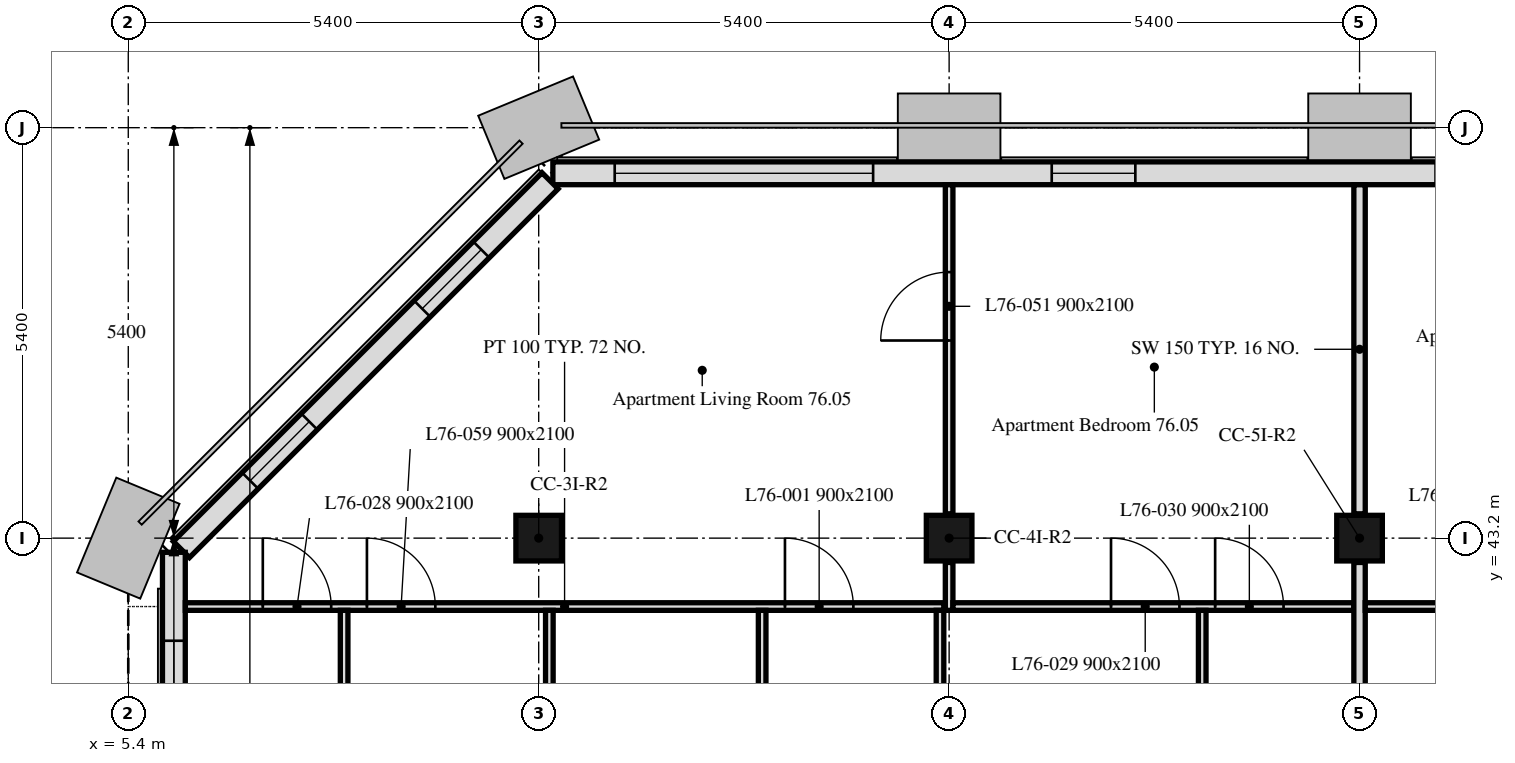
"""IFC4 building model, lengths in metres.
Left out: names, types, materials, properties, quantities, classifications, styles, units other than length and angle.
Written with IfcOpenShell. Run it as: python <this file> out.ifc"""

import sys

from ifc_helpers import new_model, si_unit, direction, frame, frame_2d, origin, origin_2d, place, context, subcontext, project, spatial, rectangle, extrude, element, fill, save


model = new_model("IFC4")
c1 = context("Model", 3, precision=1e-05, world=origin(), true_north=direction((0.0, 1.0)))
c2 = subcontext(c1, "Body", "Model", "MODEL_VIEW")
j1 = project(units=[si_unit("LENGTHUNIT", "METRE"), si_unit("PLANEANGLEUNIT", "RADIAN")], contexts=[c1])
p1 = place(None, origin())
s1 = spatial("IfcSite", under=j1, at=p1, CompositionType="ELEMENT")
p2 = place(p1, origin())
s2 = spatial("IfcBuilding", under=s1, at=p2, CompositionType="ELEMENT")
p3 = place(p2, frame((0.0, 0.0, 304.9)))
s3 = spatial("IfcBuildingStorey", under=s2, at=p3, CompositionType="ELEMENT", Elevation=304.9)
for number, where, z_axis, x_axis in (
    (1, (10.8, 43.2, 0.0), (0.0, 0.0, 1.0), (1.0, 0.0, 0.0)),
    (2, (16.2, 43.2, 0.0), (0.0, 0.0, 1.0), (1.0, 0.0, 0.0)),
    (3, (21.6, 43.2, 0.0), (0.0, 0.0, 1.0), (1.0, 0.0, 0.0)),
):
    element("IfcColumn", number, at=place(p3, frame(where, z_axis=z_axis, x_axis=x_axis)), inside=s3, PredefinedType="COLUMN", context=c2, shape_type="SweptSolid", body=[
        extrude(rectangle(XDim=0.6, YDim=0.6, at=origin_2d()), origin(), (0.0, 0.0, 1.0), 2.8),
    ])
p4 = place(p3, frame((43.014, 48.0, 0.0), z_axis=(0.0, 0.0, 1.0), x_axis=(-1.0, 0.0, 0.0)))
e4 = element("IfcWall", 4, at=p4, inside=s3, PredefinedType="SOLIDWALL", context=c2, shape_type="SweptSolid", body=[
    extrude(rectangle(XDim=32.027, YDim=0.3, at=frame_2d((16.014, 0.0))), origin(), (0.0, 0.0, 1.0), 2.8),
])
p5 = place(p4, frame((2.764, 0.0, 0.9)))
e5 = element("IfcOpeningElement", 5, at=p5, cuts=e4, PredefinedType="OPENING", context=c2, shape_type="SweptSolid", body=[
    extrude(rectangle(XDim=1.1, YDim=1.7, at=frame_2d((0.55, 0.85))), frame((0.0, 0.16, 0.0), z_axis=(0.0, -1.0, 0.0), x_axis=(1.0, 0.0, 0.0)), (0.0, 0.0, 1.0), 0.32),
])
p6 = place(p4, frame((6.214, 0.0, 0.9)))
e6 = element("IfcOpeningElement", 6, at=p6, cuts=e4, PredefinedType="OPENING", context=c2, shape_type="SweptSolid", body=[
    extrude(rectangle(XDim=3.4, YDim=1.7, at=frame_2d((1.7, 0.85))), frame((0.0, 0.16, 0.0), z_axis=(0.0, -1.0, 0.0), x_axis=(1.0, 0.0, 0.0)), (0.0, 0.0, 1.0), 0.32),
])
p7 = place(p4, frame((13.564, 0.0, 0.9)))
e7 = element("IfcOpeningElement", 7, at=p7, cuts=e4, PredefinedType="OPENING", context=c2, shape_type="SweptSolid", body=[
    extrude(rectangle(XDim=1.1, YDim=1.7, at=frame_2d((0.55, 0.85))), frame((0.0, 0.16, 0.0), z_axis=(0.0, -1.0, 0.0), x_axis=(1.0, 0.0, 0.0)), (0.0, 0.0, 1.0), 0.32),
])
p8 = place(p4, frame((17.014, 0.0, 0.9)))
e8 = element("IfcOpeningElement", 8, at=p8, cuts=e4, PredefinedType="OPENING", context=c2, shape_type="SweptSolid", body=[
    extrude(rectangle(XDim=3.4, YDim=1.7, at=frame_2d((1.7, 0.85))), frame((0.0, 0.16, 0.0), z_axis=(0.0, -1.0, 0.0), x_axis=(1.0, 0.0, 0.0)), (0.0, 0.0, 1.0), 0.32),
])
p9 = place(p4, frame((24.364, 0.0, 0.9)))
e9 = element("IfcOpeningElement", 9, at=p9, cuts=e4, PredefinedType="OPENING", context=c2, shape_type="SweptSolid", body=[
    extrude(rectangle(XDim=1.1, YDim=1.7, at=frame_2d((0.55, 0.85))), frame((0.0, 0.16, 0.0), z_axis=(0.0, -1.0, 0.0), x_axis=(1.0, 0.0, 0.0)), (0.0, 0.0, 1.0), 0.32),
])
p10 = place(p4, frame((27.814, 0.0, 0.9)))
e10 = element("IfcOpeningElement", 10, at=p10, cuts=e4, PredefinedType="OPENING", context=c2, shape_type="SweptSolid", body=[
    extrude(rectangle(XDim=3.4, YDim=1.7, at=frame_2d((1.7, 0.85))), frame((0.0, 0.16, 0.0), z_axis=(0.0, -1.0, 0.0), x_axis=(1.0, 0.0, 0.0)), (0.0, 0.0, 1.0), 0.32),
])
p11 = place(p3, frame((10.949, 47.901, 0.0), z_axis=(0.0, 0.0, 1.0), x_axis=(-0.707106781187, -0.707106781187, 0.0)))
e11 = element("IfcWall", 11, at=p11, inside=s3, PredefinedType="SOLIDWALL", context=c2, shape_type="SweptSolid", body=[
    extrude(rectangle(XDim=6.86, YDim=0.3, at=frame_2d((3.43, 0.0))), origin(), (0.0, 0.0, 1.0), 2.8),
])
p12 = place(p11, frame((1.28, 0.0, 0.9)))
e12 = element("IfcOpeningElement", 12, at=p12, cuts=e11, PredefinedType="OPENING", context=c2, shape_type="SweptSolid", body=[
    extrude(rectangle(XDim=1.1, YDim=1.7, at=frame_2d((0.55, 0.85))), frame((0.0, 0.16, 0.0), z_axis=(0.0, -1.0, 0.0), x_axis=(1.0, 0.0, 0.0)), (0.0, 0.0, 1.0), 0.32),
])
p13 = place(p11, frame((4.48, 0.0, 0.9)))
e13 = element("IfcOpeningElement", 13, at=p13, cuts=e11, PredefinedType="OPENING", context=c2, shape_type="SweptSolid", body=[
    extrude(rectangle(XDim=1.1, YDim=1.7, at=frame_2d((0.55, 0.85))), frame((0.0, 0.16, 0.0), z_axis=(0.0, -1.0, 0.0), x_axis=(1.0, 0.0, 0.0)), (0.0, 0.0, 1.0), 0.32),
])
p14 = place(p3, frame((6.0, 43.014, 0.0), z_axis=(0.0, 0.0, 1.0), x_axis=(0.0, -1.0, 0.0)))
e14 = element("IfcWall", 14, at=p14, inside=s3, PredefinedType="SOLIDWALL", context=c2, shape_type="SweptSolid", body=[
    extrude(rectangle(XDim=10.614, YDim=0.3, at=frame_2d((5.307, 0.0))), origin(), (0.0, 0.0, 1.0), 2.8),
])
p15 = place(p14, frame((1.164, 0.0, 0.9)))
e15 = element("IfcOpeningElement", 15, at=p15, cuts=e14, PredefinedType="OPENING", context=c2, shape_type="SweptSolid", body=[
    extrude(rectangle(XDim=1.1, YDim=1.7, at=frame_2d((0.55, 0.85))), frame((0.0, 0.16, 0.0), z_axis=(0.0, -1.0, 0.0), x_axis=(1.0, 0.0, 0.0)), (0.0, 0.0, 1.0), 0.32),
])
p16 = place(p14, frame((2.764, 0.0, 0.9)))
e16 = element("IfcOpeningElement", 16, at=p16, cuts=e14, PredefinedType="OPENING", context=c2, shape_type="SweptSolid", body=[
    extrude(rectangle(XDim=1.1, YDim=1.7, at=frame_2d((0.55, 0.85))), frame((0.0, 0.16, 0.0), z_axis=(0.0, -1.0, 0.0), x_axis=(1.0, 0.0, 0.0)), (0.0, 0.0, 1.0), 0.32),
])
p17 = place(p14, frame((6.564, 0.0, 0.9)))
e17 = element("IfcOpeningElement", 17, at=p17, cuts=e14, PredefinedType="OPENING", context=c2, shape_type="SweptSolid", body=[
    extrude(rectangle(XDim=1.1, YDim=1.7, at=frame_2d((0.55, 0.85))), frame((0.0, 0.16, 0.0), z_axis=(0.0, -1.0, 0.0), x_axis=(1.0, 0.0, 0.0)), (0.0, 0.0, 1.0), 0.32),
])
p18 = place(p14, frame((7.989, 0.0, 0.9)))
e18 = element("IfcOpeningElement", 18, at=p18, cuts=e14, PredefinedType="OPENING", context=c2, shape_type="SweptSolid", body=[
    extrude(rectangle(XDim=0.65, YDim=1.7, at=frame_2d((0.325, 0.85))), frame((0.0, 0.16, 0.0), z_axis=(0.0, -1.0, 0.0), x_axis=(1.0, 0.0, 0.0)), (0.0, 0.0, 1.0), 0.32),
])
p19 = place(p3, frame((6.151, 42.3, 0.0), z_axis=(0.0, 0.0, 1.0), x_axis=(1.0, 0.0, 0.0)))
e19 = element("IfcWall", 19, at=p19, inside=s3, PredefinedType="PARTITIONING", context=c2, shape_type="SweptSolid", body=[
    extrude(rectangle(XDim=9.979, YDim=0.1, at=frame_2d((4.99, 0.0))), origin(), (0.0, 0.0, 1.0), 2.2),
])
p20 = place(p19, frame((7.889, 0.0, 0.0)))
e20 = element("IfcOpeningElement", 20, at=p20, cuts=e19, PredefinedType="OPENING", context=c2, shape_type="SweptSolid", body=[
    extrude(rectangle(XDim=0.9, YDim=2.1, at=frame_2d((0.45, 1.05))), frame((0.0, 0.05, 0.0), z_axis=(0.0, -1.0, 0.0), x_axis=(1.0, 0.0, 0.0)), (0.0, 0.0, 1.0), 0.1),
])
p21 = place(p19, frame((1.019, 0.0, 0.0)))
e21 = element("IfcOpeningElement", 21, at=p21, cuts=e19, PredefinedType="OPENING", context=c2, shape_type="SweptSolid", body=[
    extrude(rectangle(XDim=0.9, YDim=2.1, at=frame_2d((0.45, 1.05))), frame((0.0, 0.05, 0.0), z_axis=(0.0, -1.0, 0.0), x_axis=(1.0, 0.0, 0.0)), (0.0, 0.0, 1.0), 0.1),
])
p22 = place(p19, frame((2.389, 0.0, 0.0)))
e22 = element("IfcOpeningElement", 22, at=p22, cuts=e19, PredefinedType="OPENING", context=c2, shape_type="SweptSolid", body=[
    extrude(rectangle(XDim=0.9, YDim=2.1, at=frame_2d((0.45, 1.05))), frame((0.0, 0.05, 0.0), z_axis=(0.0, -1.0, 0.0), x_axis=(1.0, 0.0, 0.0)), (0.0, 0.0, 1.0), 0.1),
])
p23 = place(p3, frame((16.2, 42.25, 0.0), z_axis=(0.0, 0.0, 1.0), x_axis=(0.0, 1.0, 0.0)))
e23 = element("IfcWall", 23, at=p23, inside=s3, PredefinedType="PARTITIONING", context=c2, shape_type="SweptSolid", body=[
    extrude(rectangle(XDim=0.63, YDim=0.1, at=frame_2d((0.315, 0.0))), origin(), (0.0, 0.0, 1.0), 2.2),
])
p24 = place(p3, frame((16.2, 43.52, 0.0), z_axis=(0.0, 0.0, 1.0), x_axis=(0.0, 1.0, 0.0)))
e24 = element("IfcWall", 24, at=p24, inside=s3, PredefinedType="PARTITIONING", context=c2, shape_type="SweptSolid", body=[
    extrude(rectangle(XDim=4.329, YDim=0.1, at=frame_2d((2.165, 0.0))), origin(), (0.0, 0.0, 1.0), 2.2),
])
p25 = place(p24, frame((2.28, 0.0, 0.0)))
e25 = element("IfcOpeningElement", 25, at=p25, cuts=e24, PredefinedType="OPENING", context=c2, shape_type="SweptSolid", body=[
    extrude(rectangle(XDim=0.9, YDim=2.1, at=frame_2d((0.45, 1.05))), frame((0.0, 0.05, 0.0), z_axis=(0.0, -1.0, 0.0), x_axis=(1.0, 0.0, 0.0)), (0.0, 0.0, 1.0), 0.1),
])
p26 = place(p3, frame((16.25, 42.3, 0.0), z_axis=(0.0, 0.0, 1.0), x_axis=(1.0, 0.0, 0.0)))
e26 = element("IfcWall", 26, at=p26, inside=s3, PredefinedType="PARTITIONING", context=c2, shape_type="SweptSolid", body=[
    extrude(rectangle(XDim=5.275, YDim=0.1, at=frame_2d((2.637, 0.0))), origin(), (0.0, 0.0, 1.0), 2.8),
])
p27 = place(p26, frame((2.08, 0.0, 0.0)))
e27 = element("IfcOpeningElement", 27, at=p27, cuts=e26, PredefinedType="OPENING", context=c2, shape_type="SweptSolid", body=[
    extrude(rectangle(XDim=0.9, YDim=2.1, at=frame_2d((0.45, 1.05))), frame((0.0, 0.05, 0.0), z_axis=(0.0, -1.0, 0.0), x_axis=(1.0, 0.0, 0.0)), (0.0, 0.0, 1.0), 0.1),
])
p28 = place(p26, frame((3.45, 0.0, 0.0)))
e28 = element("IfcOpeningElement", 28, at=p28, cuts=e26, PredefinedType="OPENING", context=c2, shape_type="SweptSolid", body=[
    extrude(rectangle(XDim=0.9, YDim=2.1, at=frame_2d((0.45, 1.05))), frame((0.0, 0.05, 0.0), z_axis=(0.0, -1.0, 0.0), x_axis=(1.0, 0.0, 0.0)), (0.0, 0.0, 1.0), 0.1),
])
p29 = place(p3, frame((21.6, 43.52, 0.0), z_axis=(0.0, 0.0, 1.0), x_axis=(0.0, 1.0, 0.0)))
e29 = element("IfcWall", 29, at=p29, inside=s3, PredefinedType="PARTITIONING", context=c2, shape_type="SweptSolid", body=[
    extrude(rectangle(XDim=4.329, YDim=0.15, at=frame_2d((2.165, 0.0))), origin(), (0.0, 0.0, 1.0), 2.2),
])
p30 = place(p3, frame((8.24, 34.275, 0.0), z_axis=(0.0, 0.0, 1.0), x_axis=(0.0, 1.0, 0.0)))
e30 = element("IfcWall", 30, at=p30, inside=s3, PredefinedType="PARTITIONING", context=c2, shape_type="SweptSolid", body=[
    extrude(rectangle(XDim=7.975, YDim=0.1, at=frame_2d((3.988, 0.0))), origin(), (0.0, 0.0, 1.0), 2.2),
])
p31 = place(p30, frame((0.825, 0.0, 0.0)))
e31 = element("IfcOpeningElement", 31, at=p31, cuts=e30, PredefinedType="OPENING", context=c2, shape_type="SweptSolid", body=[
    extrude(rectangle(XDim=0.9, YDim=2.1, at=frame_2d((0.45, 1.05))), frame((0.0, 0.05, 0.0), z_axis=(0.0, -1.0, 0.0), x_axis=(1.0, 0.0, 0.0)), (0.0, 0.0, 1.0), 0.1),
])
p32 = place(p30, frame((4.875, 0.0, 0.0)))
e32 = element("IfcOpeningElement", 32, at=p32, cuts=e30, PredefinedType="OPENING", context=c2, shape_type="SweptSolid", body=[
    extrude(rectangle(XDim=0.9, YDim=2.1, at=frame_2d((0.45, 1.05))), frame((0.0, 0.05, 0.0), z_axis=(0.0, -1.0, 0.0), x_axis=(1.0, 0.0, 0.0)), (0.0, 0.0, 1.0), 0.1),
])
p33 = place(p3, frame((10.94, 38.12, 0.0), z_axis=(0.0, 0.0, 1.0), x_axis=(0.0, 1.0, 0.0)))
e33 = element("IfcWall", 33, at=p33, inside=s3, PredefinedType="PARTITIONING", context=c2, shape_type="SweptSolid", body=[
    extrude(rectangle(XDim=4.13, YDim=0.1, at=frame_2d((2.065, 0.0))), origin(), (0.0, 0.0, 1.0), 2.2),
])
p34 = place(p33, frame((2.005, 0.0, 0.0)))
e34 = element("IfcOpeningElement", 34, at=p34, cuts=e33, PredefinedType="OPENING", context=c2, shape_type="SweptSolid", body=[
    extrude(rectangle(XDim=0.9, YDim=2.1, at=frame_2d((0.45, 1.05))), frame((0.0, 0.05, 0.0), z_axis=(0.0, -1.0, 0.0), x_axis=(1.0, 0.0, 0.0)), (0.0, 0.0, 1.0), 0.1),
])
p35 = place(p3, frame((13.74, 34.275, 0.0), z_axis=(0.0, 0.0, 1.0), x_axis=(0.0, 1.0, 0.0)))
e35 = element("IfcWall", 35, at=p35, inside=s3, PredefinedType="PARTITIONING", context=c2, shape_type="SweptSolid", body=[
    extrude(rectangle(XDim=7.975, YDim=0.1, at=frame_2d((3.988, 0.0))), origin(), (0.0, 0.0, 1.0), 2.2),
])
p36 = place(p3, frame((16.08, 38.12, 0.0), z_axis=(0.0, 0.0, 1.0), x_axis=(0.0, 1.0, 0.0)))
e36 = element("IfcWall", 36, at=p36, inside=s3, PredefinedType="PARTITIONING", context=c2, shape_type="SweptSolid", body=[
    extrude(rectangle(XDim=4.13, YDim=0.1, at=frame_2d((2.065, 0.0))), origin(), (0.0, 0.0, 1.0), 2.2),
])
p37 = place(p3, frame((19.53, 36.95, 0.0), z_axis=(0.0, 0.0, 1.0), x_axis=(0.0, 1.0, 0.0)))
e37 = element("IfcWall", 37, at=p37, inside=s3, PredefinedType="PARTITIONING", context=c2, shape_type="SweptSolid", body=[
    extrude(rectangle(XDim=5.3, YDim=0.1, at=frame_2d((2.65, 0.0))), origin(), (0.0, 0.0, 1.0), 2.8),
])
p38 = place(p3, frame((21.6, 38.12, 0.0), z_axis=(0.0, 0.0, 1.0), x_axis=(0.0, 1.0, 0.0)))
e38 = element("IfcWall", 38, at=p38, inside=s3, PredefinedType="PARTITIONING", context=c2, shape_type="SweptSolid", body=[
    extrude(rectangle(XDim=4.76, YDim=0.15, at=frame_2d((2.38, 0.0))), origin(), (0.0, 0.0, 1.0), 2.2),
])
p39 = place(p3, frame((21.675, 42.3, 0.0), z_axis=(0.0, 0.0, 1.0), x_axis=(1.0, 0.0, 0.0)))
e39 = element("IfcWall", 39, at=p39, inside=s3, PredefinedType="PARTITIONING", context=c2, shape_type="SweptSolid", body=[
    extrude(rectangle(XDim=5.097, YDim=0.1, at=frame_2d((2.548, 0.0))), origin(), (0.0, 0.0, 1.0), 2.8),
])
p40 = place(p39, frame((1.097, 0.0, 0.0)))
e40 = element("IfcOpeningElement", 40, at=p40, cuts=e39, PredefinedType="OPENING", context=c2, shape_type="SweptSolid", body=[
    extrude(rectangle(XDim=0.9, YDim=2.1, at=frame_2d((0.45, 1.05))), frame((0.0, 0.05, 0.0), z_axis=(0.0, -1.0, 0.0), x_axis=(1.0, 0.0, 0.0)), (0.0, 0.0, 1.0), 0.1),
])
p41 = place(p39, frame((2.597, 0.0, 0.0)))
e41 = element("IfcOpeningElement", 41, at=p41, cuts=e39, PredefinedType="OPENING", context=c2, shape_type="SweptSolid", body=[
    extrude(rectangle(XDim=0.9, YDim=2.1, at=frame_2d((0.45, 1.05))), frame((0.0, 0.05, 0.0), z_axis=(0.0, -1.0, 0.0), x_axis=(1.0, 0.0, 0.0)), (0.0, 0.0, 1.0), 0.1),
])
p42 = place(p9, origin())
e42 = element("IfcWindow", 42, at=p42, inside=s3, PartitioningType="SINGLE_PANEL", PredefinedType="WINDOW", context=c2, shape_type="SweptSolid", body=[
    extrude(rectangle(XDim=1.1, YDim=1.7, at=frame_2d((0.55, 0.85))), frame((0.0, 0.03, 0.0), z_axis=(0.0, -1.0, 0.0), x_axis=(1.0, 0.0, 0.0)), (0.0, 0.0, 1.0), 0.06),
])
fill(e9, e42)
p43 = place(p10, origin())
e43 = element("IfcWindow", 43, at=p43, inside=s3, PartitioningType="SINGLE_PANEL", PredefinedType="WINDOW", context=c2, shape_type="SweptSolid", body=[
    extrude(rectangle(XDim=3.4, YDim=1.7, at=frame_2d((1.7, 0.85))), frame((0.0, 0.03, 0.0), z_axis=(0.0, -1.0, 0.0), x_axis=(1.0, 0.0, 0.0)), (0.0, 0.0, 1.0), 0.06),
])
fill(e10, e43)
p44 = place(p12, origin())
e44 = element("IfcWindow", 44, at=p44, inside=s3, PartitioningType="SINGLE_PANEL", PredefinedType="WINDOW", context=c2, shape_type="SweptSolid", body=[
    extrude(rectangle(XDim=1.1, YDim=1.7, at=frame_2d((0.55, 0.85))), frame((0.0, 0.03, 0.0), z_axis=(0.0, -1.0, 0.0), x_axis=(1.0, 0.0, 0.0)), (0.0, 0.0, 1.0), 0.06),
])
fill(e12, e44)
p45 = place(p13, origin())
e45 = element("IfcWindow", 45, at=p45, inside=s3, PartitioningType="SINGLE_PANEL", PredefinedType="WINDOW", context=c2, shape_type="SweptSolid", body=[
    extrude(rectangle(XDim=1.1, YDim=1.7, at=frame_2d((0.55, 0.85))), frame((0.0, 0.03, 0.0), z_axis=(0.0, -1.0, 0.0), x_axis=(1.0, 0.0, 0.0)), (0.0, 0.0, 1.0), 0.06),
])
fill(e13, e45)
p46 = place(p15, origin())
e46 = element("IfcWindow", 46, at=p46, inside=s3, PartitioningType="SINGLE_PANEL", PredefinedType="WINDOW", context=c2, shape_type="SweptSolid", body=[
    extrude(rectangle(XDim=1.1, YDim=1.7, at=frame_2d((0.55, 0.85))), frame((0.0, 0.03, 0.0), z_axis=(0.0, -1.0, 0.0), x_axis=(1.0, 0.0, 0.0)), (0.0, 0.0, 1.0), 0.06),
])
fill(e15, e46)
p47 = place(p20, origin())
e47 = element("IfcDoor", 47, at=p47, inside=s3, OperationType="SINGLE_SWING_LEFT", PredefinedType="DOOR", context=c2, shape_type="SweptSolid", body=[
    extrude(rectangle(XDim=0.9, YDim=2.1, at=frame_2d((0.45, 1.05))), frame((0.0, 0.025, 0.0), z_axis=(0.0, -1.0, 0.0), x_axis=(1.0, 0.0, 0.0)), (0.0, 0.0, 1.0), 0.05),
])
fill(e20, e47)
p48 = place(p21, origin())
e48 = element("IfcDoor", 48, at=p48, inside=s3, OperationType="SINGLE_SWING_RIGHT", PredefinedType="DOOR", context=c2, shape_type="SweptSolid", body=[
    extrude(rectangle(XDim=0.9, YDim=2.1, at=frame_2d((0.45, 1.05))), frame((0.0, 0.025, 0.0), z_axis=(0.0, -1.0, 0.0), x_axis=(1.0, 0.0, 0.0)), (0.0, 0.0, 1.0), 0.05),
])
fill(e21, e48)
p49 = place(p27, origin())
e49 = element("IfcDoor", 49, at=p49, inside=s3, OperationType="SINGLE_SWING_RIGHT", PredefinedType="DOOR", context=c2, shape_type="SweptSolid", body=[
    extrude(rectangle(XDim=0.9, YDim=2.1, at=frame_2d((0.45, 1.05))), frame((0.0, 0.025, 0.0), z_axis=(0.0, -1.0, 0.0), x_axis=(1.0, 0.0, 0.0)), (0.0, 0.0, 1.0), 0.05),
])
fill(e27, e49)
p50 = place(p28, origin())
e50 = element("IfcDoor", 50, at=p50, inside=s3, OperationType="SINGLE_SWING_LEFT", PredefinedType="DOOR", context=c2, shape_type="SweptSolid", body=[
    extrude(rectangle(XDim=0.9, YDim=2.1, at=frame_2d((0.45, 1.05))), frame((0.0, 0.025, 0.0), z_axis=(0.0, -1.0, 0.0), x_axis=(1.0, 0.0, 0.0)), (0.0, 0.0, 1.0), 0.05),
])
fill(e28, e50)
p51 = place(p25, origin())
e51 = element("IfcDoor", 51, at=p51, inside=s3, OperationType="SINGLE_SWING_RIGHT", PredefinedType="DOOR", context=c2, shape_type="SweptSolid", body=[
    extrude(rectangle(XDim=0.9, YDim=2.1, at=frame_2d((0.45, 1.05))), frame((0.0, 0.025, 0.0), z_axis=(0.0, -1.0, 0.0), x_axis=(1.0, 0.0, 0.0)), (0.0, 0.0, 1.0), 0.05),
])
fill(e25, e51)
p52 = place(p22, origin())
e52 = element("IfcDoor", 52, at=p52, inside=s3, OperationType="SINGLE_SWING_LEFT", PredefinedType="DOOR", context=c2, shape_type="SweptSolid", body=[
    extrude(rectangle(XDim=0.9, YDim=2.1, at=frame_2d((0.45, 1.05))), frame((0.0, 0.025, 0.0), z_axis=(0.0, -1.0, 0.0), x_axis=(1.0, 0.0, 0.0)), (0.0, 0.0, 1.0), 0.05),
])
fill(e22, e52)
save(model, sys.argv[1])
